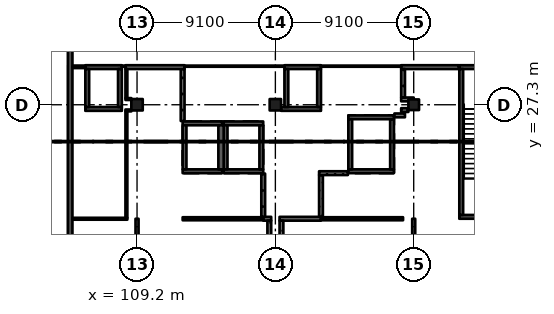
"""IFC4 building model, lengths in metres.
Left out: names, types, materials, properties, quantities, classifications, styles, units other than length and angle.
Written with IfcOpenShell. Run it as: python <this file> out.ifc"""

import sys

from ifc_helpers import new_model, si_unit, direction, frame, frame_2d, origin, origin_2d, place, context, subcontext, project, spatial, rectangle, extrude, element, fill, save


model = new_model("IFC4")
c1 = context("Model", 3, precision=1e-05, world=origin(), true_north=direction((0.0, 1.0)))
c2 = subcontext(c1, "Body", "Model", "MODEL_VIEW")
j1 = project(units=[si_unit("LENGTHUNIT", "METRE"), si_unit("PLANEANGLEUNIT", "RADIAN")], contexts=[c1])
p1 = place(None, origin())
s1 = spatial("IfcSite", under=j1, at=p1, CompositionType="ELEMENT")
p2 = place(p1, origin())
s2 = spatial("IfcBuilding", under=s1, at=p2, CompositionType="ELEMENT")
p3 = place(p2, frame((0.0, 0.0, 10.92)))
s3 = spatial("IfcBuildingStorey", under=s2, at=p3, CompositionType="ELEMENT", Elevation=10.92)
for number, where, z_axis, x_axis in (
    (1, (109.2, 27.3, 0.0), (0.0, 0.0, 1.0), (1.0, 0.0, 0.0)),
    (2, (118.3, 27.3, 0.0), (0.0, 0.0, 1.0), (1.0, 0.0, 0.0)),
):
    element("IfcColumn", number, at=place(p3, frame(where, z_axis=z_axis, x_axis=x_axis)), inside=s3, PredefinedType="COLUMN", context=c2, shape_type="SweptSolid", body=[
        extrude(rectangle(XDim=0.75, YDim=0.75, at=origin_2d()), origin(), (0.0, 0.0, 1.0), 4.55),
    ])
p4 = place(p3, frame((127.4, 27.3, 0.0), z_axis=(0.0, 0.0, 1.0), x_axis=(1.0, 0.0, 0.0)))
e3 = element("IfcColumn", 3, at=p4, inside=s3, PredefinedType="COLUMN", context=c2, shape_type="SweptSolid", body=[
    extrude(rectangle(XDim=0.7, YDim=0.7, at=origin_2d()), origin(), (0.0, 0.0, 1.0), 4.55),
])
p5 = place(p3, frame((104.8, 40.95, 0.0), z_axis=(0.0, 0.0, 1.0), x_axis=(0.0, -1.0, 0.0)))
e4 = element("IfcWall", 4, at=p5, inside=s3, PredefinedType="SHEAR", context=c2, shape_type="SweptSolid", body=[
    extrude(rectangle(XDim=22.75, YDim=0.3, at=frame_2d((11.375, 0.0))), origin(), (0.0, 0.0, 1.0), 4.55),
])
p6 = place(p3, frame((117.5, 22.925, 0.0), z_axis=(0.0, 0.0, 1.0), x_axis=(-1.0, 0.0, 0.0)))
e5 = element("IfcWall", 5, at=p6, inside=s3, PredefinedType="SHEAR", context=c2, shape_type="SweptSolid", body=[
    extrude(rectangle(XDim=2.6, YDim=0.25, at=frame_2d((1.3, 0.0))), origin(), (0.0, 0.0, 1.0), 4.55),
])
p7 = place(p6, frame((0.8, 0.0, 0.0)))
e6 = element("IfcOpeningElement", 6, at=p7, cuts=e5, PredefinedType="OPENING", context=c2, shape_type="SweptSolid", body=[
    extrude(rectangle(XDim=1.0, YDim=2.1, at=frame_2d((0.5, 1.05))), frame((0.0, 0.135, 0.0), z_axis=(0.0, -1.0, 0.0), x_axis=(1.0, 0.0, 0.0)), (0.0, 0.0, 1.0), 0.27),
])
p8 = place(p3, frame((117.5, 26.075, 0.0), z_axis=(0.0, 0.0, 1.0), x_axis=(-1.0, 0.0, 0.0)))
e7 = element("IfcWall", 7, at=p8, inside=s3, PredefinedType="SHEAR", context=c2, shape_type="SweptSolid", body=[
    extrude(rectangle(XDim=2.6, YDim=0.25, at=frame_2d((1.3, 0.0))), origin(), (0.0, 0.0, 1.0), 4.55),
])
for number, where, z_axis, x_axis in (
    (8, (115.025, 25.95, 0.0), (0.0, 0.0, 1.0), (0.0, -1.0, 0.0)),
    (9, (117.375, 25.95, 0.0), (0.0, 0.0, 1.0), (0.0, -1.0, 0.0)),
):
    element("IfcWall", number, at=place(p3, frame(where, z_axis=z_axis, x_axis=x_axis)), inside=s3, PredefinedType="SHEAR", context=c2, shape_type="SweptSolid", body=[
        extrude(rectangle(XDim=2.9, YDim=0.25, at=frame_2d((1.45, 0.0))), origin(), (0.0, 0.0, 1.0), 4.55),
    ])
p9 = place(p3, frame((114.8, 22.925, 0.0), z_axis=(0.0, 0.0, 1.0), x_axis=(-1.0, 0.0, 0.0)))
e10 = element("IfcWall", 10, at=p9, inside=s3, PredefinedType="SHEAR", context=c2, shape_type="SweptSolid", body=[
    extrude(rectangle(XDim=2.6, YDim=0.25, at=frame_2d((1.3, 0.0))), origin(), (0.0, 0.0, 1.0), 4.55),
])
p10 = place(p9, frame((0.8, 0.0, 0.0)))
e11 = element("IfcOpeningElement", 11, at=p10, cuts=e10, PredefinedType="OPENING", context=c2, shape_type="SweptSolid", body=[
    extrude(rectangle(XDim=1.0, YDim=2.1, at=frame_2d((0.5, 1.05))), frame((0.0, 0.135, 0.0), z_axis=(0.0, -1.0, 0.0), x_axis=(1.0, 0.0, 0.0)), (0.0, 0.0, 1.0), 0.27),
])
p11 = place(p3, frame((114.8, 26.075, 0.0), z_axis=(0.0, 0.0, 1.0), x_axis=(-1.0, 0.0, 0.0)))
e12 = element("IfcWall", 12, at=p11, inside=s3, PredefinedType="SHEAR", context=c2, shape_type="SweptSolid", body=[
    extrude(rectangle(XDim=2.6, YDim=0.25, at=frame_2d((1.3, 0.0))), origin(), (0.0, 0.0, 1.0), 4.55),
])
p12 = place(p3, frame((112.325, 25.95, 0.0), z_axis=(0.0, 0.0, 1.0), x_axis=(0.0, -1.0, 0.0)))
e13 = element("IfcWall", 13, at=p12, inside=s3, PredefinedType="SHEAR", context=c2, shape_type="SweptSolid", body=[
    extrude(rectangle(XDim=2.9, YDim=0.25, at=frame_2d((1.45, 0.0))), origin(), (0.0, 0.0, 1.0), 4.55),
])
p13 = place(p3, frame((114.725, 25.95, 0.0), z_axis=(0.0, 0.0, 1.0), x_axis=(0.0, -1.0, 0.0)))
e14 = element("IfcWall", 14, at=p13, inside=s3, PredefinedType="SHEAR", context=c2, shape_type="SweptSolid", body=[
    extrude(rectangle(XDim=2.9, YDim=0.35, at=frame_2d((1.45, 0.0))), origin(), (0.0, 0.0, 1.0), 4.55),
])
p14 = place(p3, frame((108.2, 27.025, 0.0), z_axis=(0.0, 0.0, 1.0), x_axis=(-1.0, 0.0, 0.0)))
e15 = element("IfcWall", 15, at=p14, inside=s3, PredefinedType="SHEAR", context=c2, shape_type="SweptSolid", body=[
    extrude(rectangle(XDim=2.4, YDim=0.25, at=frame_2d((1.2, 0.0))), origin(), (0.0, 0.0, 1.0), 4.55),
])
p15 = place(p14, frame((0.75, 0.0, 0.0)))
e16 = element("IfcOpeningElement", 16, at=p15, cuts=e15, PredefinedType="OPENING", context=c2, shape_type="SweptSolid", body=[
    extrude(rectangle(XDim=0.9, YDim=2.1, at=frame_2d((0.45, 1.05))), frame((0.0, 0.135, 0.0), z_axis=(0.0, -1.0, 0.0), x_axis=(1.0, 0.0, 0.0)), (0.0, 0.0, 1.0), 0.27),
])
p16 = place(p3, frame((108.2, 29.775, 0.0), z_axis=(0.0, 0.0, 1.0), x_axis=(-1.0, 0.0, 0.0)))
e17 = element("IfcWall", 17, at=p16, inside=s3, PredefinedType="SHEAR", context=c2, shape_type="SweptSolid", body=[
    extrude(rectangle(XDim=2.4, YDim=0.25, at=frame_2d((1.2, 0.0))), origin(), (0.0, 0.0, 1.0), 4.55),
])
for number, where, z_axis, x_axis in (
    (18, (105.925, 29.65, 0.0), (0.0, 0.0, 1.0), (0.0, -1.0, 0.0)),
    (19, (108.075, 29.65, 0.0), (0.0, 0.0, 1.0), (0.0, -1.0, 0.0)),
):
    element("IfcWall", number, at=place(p3, frame(where, z_axis=z_axis, x_axis=x_axis)), inside=s3, PredefinedType="SHEAR", context=c2, shape_type="SweptSolid", body=[
        extrude(rectangle(XDim=2.5, YDim=0.25, at=frame_2d((1.25, 0.0))), origin(), (0.0, 0.0, 1.0), 4.55),
    ])
p17 = place(p3, frame((121.3, 27.025, 0.0), z_axis=(0.0, 0.0, 1.0), x_axis=(-1.0, 0.0, 0.0)))
e20 = element("IfcWall", 20, at=p17, inside=s3, PredefinedType="SHEAR", context=c2, shape_type="SweptSolid", body=[
    extrude(rectangle(XDim=2.625, YDim=0.25, at=frame_2d((1.312, 0.0))), origin(), (0.0, 0.0, 1.0), 4.55),
])
p18 = place(p3, frame((121.3, 29.775, 0.0), z_axis=(0.0, 0.0, 1.0), x_axis=(-1.0, 0.0, 0.0)))
e21 = element("IfcWall", 21, at=p18, inside=s3, PredefinedType="SHEAR", context=c2, shape_type="SweptSolid", body=[
    extrude(rectangle(XDim=2.4, YDim=0.25, at=frame_2d((1.2, 0.0))), origin(), (0.0, 0.0, 1.0), 4.55),
])
p19 = place(p3, frame((119.025, 29.65, 0.0), z_axis=(0.0, 0.0, 1.0), x_axis=(0.0, -1.0, 0.0)))
e22 = element("IfcWall", 22, at=p19, inside=s3, PredefinedType="SHEAR", context=c2, shape_type="SweptSolid", body=[
    extrude(rectangle(XDim=2.5, YDim=0.25, at=frame_2d((1.25, 0.0))), origin(), (0.0, 0.0, 1.0), 4.55),
])
p20 = place(p3, frame((121.175, 29.65, 0.0), z_axis=(0.0, 0.0, 1.0), x_axis=(0.0, -1.0, 0.0)))
e23 = element("IfcWall", 23, at=p20, inside=s3, PredefinedType="SHEAR", context=c2, shape_type="SweptSolid", body=[
    extrude(rectangle(XDim=2.5, YDim=0.25, at=frame_2d((1.25, 0.0))), origin(), (0.0, 0.0, 1.0), 4.55),
])
p21 = place(p20, frame((0.9, 0.0, 0.0)))
e24 = element("IfcOpeningElement", 24, at=p21, cuts=e23, PredefinedType="OPENING", context=c2, shape_type="SweptSolid", body=[
    extrude(rectangle(XDim=0.7, YDim=2.1, at=frame_2d((0.35, 1.05))), frame((0.0, 0.135, 0.0), z_axis=(0.0, -1.0, 0.0), x_axis=(1.0, 0.0, 0.0)), (0.0, 0.0, 1.0), 0.27),
])
p22 = place(p3, frame((126.1, 22.925, 0.0), z_axis=(0.0, 0.0, 1.0), x_axis=(-1.0, 0.0, 0.0)))
e25 = element("IfcWall", 25, at=p22, inside=s3, PredefinedType="SHEAR", context=c2, shape_type="SweptSolid", body=[
    extrude(rectangle(XDim=3.0, YDim=0.25, at=frame_2d((1.5, 0.0))), origin(), (0.0, 0.0, 1.0), 4.55),
])
p23 = place(p22, frame((0.95, 0.0, 0.0)))
e26 = element("IfcOpeningElement", 26, at=p23, cuts=e25, PredefinedType="OPENING", context=c2, shape_type="SweptSolid", body=[
    extrude(rectangle(XDim=1.1, YDim=2.1, at=frame_2d((0.55, 1.05))), frame((0.0, 0.135, 0.0), z_axis=(0.0, -1.0, 0.0), x_axis=(1.0, 0.0, 0.0)), (0.0, 0.0, 1.0), 0.27),
])
p24 = place(p3, frame((126.1, 26.475, 0.0), z_axis=(0.0, 0.0, 1.0), x_axis=(-1.0, 0.0, 0.0)))
e27 = element("IfcWall", 27, at=p24, inside=s3, PredefinedType="SHEAR", context=c2, shape_type="SweptSolid", body=[
    extrude(rectangle(XDim=3.0, YDim=0.25, at=frame_2d((1.5, 0.0))), origin(), (0.0, 0.0, 1.0), 4.55),
])
for number, where, z_axis, x_axis in (
    (28, (123.225, 26.35, 0.0), (0.0, 0.0, 1.0), (0.0, -1.0, 0.0)),
    (29, (125.975, 26.35, 0.0), (0.0, 0.0, 1.0), (0.0, -1.0, 0.0)),
):
    element("IfcWall", number, at=place(p3, frame(where, z_axis=z_axis, x_axis=x_axis)), inside=s3, PredefinedType="SHEAR", context=c2, shape_type="SweptSolid", body=[
        extrude(rectangle(XDim=3.3, YDim=0.25, at=frame_2d((1.65, 0.0))), origin(), (0.0, 0.0, 1.0), 4.55),
    ])
p25 = place(p3, frame((135.8, 19.925, 0.0), z_axis=(0.0, 0.0, 1.0), x_axis=(-1.0, 0.0, 0.0)))
e30 = element("IfcWall", 30, at=p25, inside=s3, PredefinedType="SHEAR", context=c2, shape_type="SweptSolid", body=[
    extrude(rectangle(XDim=5.4, YDim=0.25, at=frame_2d((2.7, 0.0))), origin(), (0.0, 0.0, 1.0), 4.55),
])
p26 = place(p25, frame((1.5, 0.0, 0.0)))
e31 = element("IfcOpeningElement", 31, at=p26, cuts=e30, PredefinedType="OPENING", context=c2, shape_type="SweptSolid", body=[
    extrude(rectangle(XDim=2.4, YDim=2.1, at=frame_2d((1.2, 1.05))), frame((0.0, 0.135, 0.0), z_axis=(0.0, -1.0, 0.0), x_axis=(1.0, 0.0, 0.0)), (0.0, 0.0, 1.0), 0.27),
])
p27 = place(p3, frame((135.8, 29.775, 0.0), z_axis=(0.0, 0.0, 1.0), x_axis=(-1.0, 0.0, 0.0)))
e32 = element("IfcWall", 32, at=p27, inside=s3, PredefinedType="SHEAR", context=c2, shape_type="SweptSolid", body=[
    extrude(rectangle(XDim=5.4, YDim=0.25, at=frame_2d((2.7, 0.0))), origin(), (0.0, 0.0, 1.0), 4.55),
])
p28 = place(p3, frame((130.525, 29.65, 0.0), z_axis=(0.0, 0.0, 1.0), x_axis=(0.0, -1.0, 0.0)))
e33 = element("IfcWall", 33, at=p28, inside=s3, PredefinedType="SHEAR", context=c2, shape_type="SweptSolid", body=[
    extrude(rectangle(XDim=9.6, YDim=0.25, at=frame_2d((4.8, 0.0))), origin(), (0.0, 0.0, 1.0), 4.55),
])
p29 = place(p3, frame((104.95, 19.8, 0.0), z_axis=(0.0, 0.0, 1.0), x_axis=(1.0, 0.0, 0.0)))
e34 = element("IfcWall", 34, at=p29, inside=s3, PredefinedType="PARTITIONING", context=c2, shape_type="SweptSolid", body=[
    extrude(rectangle(XDim=3.613, YDim=0.125, at=frame_2d((1.806, 0.0))), origin(), (0.0, 0.0, 1.0), 4.25),
])
p30 = place(p29, frame((1.35, 0.0, 0.0)))
e35 = element("IfcOpeningElement", 35, at=p30, cuts=e34, PredefinedType="OPENING", context=c2, shape_type="SweptSolid", body=[
    extrude(rectangle(XDim=0.9, YDim=2.1, at=frame_2d((0.45, 1.05))), frame((0.0, 0.073, 0.0), z_axis=(0.0, -1.0, 0.0), x_axis=(1.0, 0.0, 0.0)), (0.0, 0.0, 1.0), 0.145),
])
p31 = place(p3, frame((104.95, 29.775, 0.0), z_axis=(0.0, 0.0, 1.0), x_axis=(1.0, 0.0, 0.0)))
e36 = element("IfcWall", 36, at=p31, inside=s3, PredefinedType="PARTITIONING", context=c2, shape_type="SweptSolid", body=[
    extrude(rectangle(XDim=0.82, YDim=0.125, at=frame_2d((0.41, 0.0))), origin(), (0.0, 0.0, 1.0), 4.25),
])
p32 = place(p3, frame((108.438, 26.925, 0.0), z_axis=(0.0, 0.0, 1.0), x_axis=(1.0, 0.0, 0.0)))
e37 = element("IfcWall", 37, at=p32, inside=s3, PredefinedType="PARTITIONING", context=c2, shape_type="SweptSolid", body=[
    extrude(rectangle(XDim=0.387, YDim=0.125, at=frame_2d((0.194, 0.0))), origin(), (0.0, 0.0, 1.0), 4.25),
])
p33 = place(p3, frame((108.5, 19.863, 0.0), z_axis=(0.0, 0.0, 1.0), x_axis=(0.0, 1.0, 0.0)))
e38 = element("IfcWall", 38, at=p33, inside=s3, PredefinedType="PARTITIONING", context=c2, shape_type="SweptSolid", body=[
    extrude(rectangle(XDim=7.0, YDim=0.125, at=frame_2d((3.5, 0.0))), origin(), (0.0, 0.0, 1.0), 4.25),
])
p34 = place(p3, frame((108.5, 27.738, 0.0), z_axis=(0.0, 0.0, 1.0), x_axis=(0.0, 1.0, 0.0)))
e39 = element("IfcWall", 39, at=p34, inside=s3, PredefinedType="PARTITIONING", context=c2, shape_type="SweptSolid", body=[
    extrude(rectangle(XDim=1.912, YDim=0.125, at=frame_2d((0.956, 0.0))), origin(), (0.0, 0.0, 1.0), 4.25),
])
p35 = place(p3, frame((108.825, 27.675, 0.0), z_axis=(0.0, 0.0, 1.0), x_axis=(-1.0, 0.0, 0.0)))
e40 = element("IfcWall", 40, at=p35, inside=s3, PredefinedType="PARTITIONING", context=c2, shape_type="SweptSolid", body=[
    extrude(rectangle(XDim=0.387, YDim=0.125, at=frame_2d((0.194, 0.0))), origin(), (0.0, 0.0, 1.0), 4.25),
])
p36 = place(p3, frame((109.2, 18.6, 0.0), z_axis=(0.0, 0.0, 1.0), x_axis=(0.0, 1.0, 0.0)))
e41 = element("IfcWall", 41, at=p36, inside=s3, PredefinedType="PARTITIONING", context=c2, shape_type="SweptSolid", body=[
    extrude(rectangle(XDim=1.2, YDim=0.2, at=frame_2d((0.6, 0.0))), origin(), (0.0, 0.0, 1.0), 3.55),
])
p37 = place(p3, frame((112.2, 19.8, 0.0), z_axis=(0.0, 0.0, 1.0), x_axis=(1.0, 0.0, 0.0)))
e42 = element("IfcWall", 42, at=p37, inside=s3, PredefinedType="PARTITIONING", context=c2, shape_type="SweptSolid", body=[
    extrude(rectangle(XDim=5.3, YDim=0.2, at=frame_2d((2.65, 0.0))), origin(), (0.0, 0.0, 1.0), 4.25),
])
p38 = place(p37, frame((1.75, 0.0, 0.0)))
e43 = element("IfcOpeningElement", 43, at=p38, cuts=e42, PredefinedType="OPENING", context=c2, shape_type="SweptSolid", body=[
    extrude(rectangle(XDim=1.8, YDim=2.4, at=frame_2d((0.9, 1.2))), frame((0.0, 0.11, 0.0), z_axis=(0.0, -1.0, 0.0), x_axis=(1.0, 0.0, 0.0)), (0.0, 0.0, 1.0), 0.22),
])
p39 = place(p3, frame((112.2, 26.23, 0.0), z_axis=(0.0, 0.0, 1.0), x_axis=(0.0, 1.0, 0.0)))
e44 = element("IfcWall", 44, at=p39, inside=s3, PredefinedType="SOLIDWALL", context=c2, shape_type="SweptSolid", body=[
    extrude(rectangle(XDim=3.42, YDim=0.25, at=frame_2d((1.71, 0.0))), origin(), (0.0, 0.0, 1.0), 4.25),
])
p40 = place(p3, frame((112.325, 29.775, 0.0), z_axis=(0.0, 0.0, 1.0), x_axis=(-1.0, 0.0, 0.0)))
e45 = element("IfcWall", 45, at=p40, inside=s3, PredefinedType="SOLIDWALL", context=c2, shape_type="SweptSolid", body=[
    extrude(rectangle(XDim=3.887, YDim=0.25, at=frame_2d((1.944, 0.0))), origin(), (0.0, 0.0, 1.0), 4.25),
])
p41 = place(p3, frame((117.5, 19.8, 0.0), z_axis=(0.0, 0.0, 1.0), x_axis=(1.0, 0.0, 0.0)))
e46 = element("IfcWall", 46, at=p41, inside=s3, PredefinedType="SOLIDWALL", context=c2, shape_type="SweptSolid", body=[
    extrude(rectangle(XDim=0.525, YDim=0.25, at=frame_2d((0.262, 0.0))), origin(), (0.0, 0.0, 1.0), 4.25),
])
p42 = place(p3, frame((117.5, 19.925, 0.0), z_axis=(0.0, 0.0, 1.0), x_axis=(0.0, 1.0, 0.0)))
e47 = element("IfcWall", 47, at=p42, inside=s3, PredefinedType="SOLIDWALL", context=c2, shape_type="SweptSolid", body=[
    extrude(rectangle(XDim=2.845, YDim=0.25, at=frame_2d((1.422, 0.0))), origin(), (0.0, 0.0, 1.0), 4.25),
])
p43 = place(p3, frame((117.9, 19.675, 0.0), z_axis=(0.0, 0.0, 1.0), x_axis=(0.0, -1.0, 0.0)))
e48 = element("IfcWall", 48, at=p43, inside=s3, PredefinedType="SOLIDWALL", context=c2, shape_type="SweptSolid", body=[
    extrude(rectangle(XDim=1.075, YDim=0.25, at=frame_2d((0.538, 0.0))), origin(), (0.0, 0.0, 1.0), 4.25),
])
p44 = place(p3, frame((118.575, 19.8, 0.0), z_axis=(0.0, 0.0, 1.0), x_axis=(1.0, 0.0, 0.0)))
e49 = element("IfcWall", 49, at=p44, inside=s3, PredefinedType="SOLIDWALL", context=c2, shape_type="SweptSolid", body=[
    extrude(rectangle(XDim=2.725, YDim=0.25, at=frame_2d((1.363, 0.0))), origin(), (0.0, 0.0, 1.0), 4.25),
])
p45 = place(p44, frame((0.85, 0.0, 0.0)))
e50 = element("IfcOpeningElement", 50, at=p45, cuts=e49, PredefinedType="OPENING", context=c2, shape_type="SweptSolid", body=[
    extrude(rectangle(XDim=1.0, YDim=2.1, at=frame_2d((0.5, 1.05))), frame((0.0, 0.135, 0.0), z_axis=(0.0, -1.0, 0.0), x_axis=(1.0, 0.0, 0.0)), (0.0, 0.0, 1.0), 0.27),
])
p46 = place(p3, frame((118.7, 18.6, 0.0), z_axis=(0.0, 0.0, 1.0), x_axis=(0.0, 1.0, 0.0)))
e51 = element("IfcWall", 51, at=p46, inside=s3, PredefinedType="SOLIDWALL", context=c2, shape_type="SweptSolid", body=[
    extrude(rectangle(XDim=1.075, YDim=0.25, at=frame_2d((0.538, 0.0))), origin(), (0.0, 0.0, 1.0), 4.25),
])
p47 = place(p3, frame((121.3, 19.8, 0.0), z_axis=(0.0, 0.0, 1.0), x_axis=(1.0, 0.0, 0.0)))
e52 = element("IfcWall", 52, at=p47, inside=s3, PredefinedType="PARTITIONING", context=c2, shape_type="SweptSolid", body=[
    extrude(rectangle(XDim=5.4, YDim=0.2, at=frame_2d((2.7, 0.0))), origin(), (0.0, 0.0, 1.0), 4.25),
])
p48 = place(p47, frame((1.85, 0.0, 0.0)))
e53 = element("IfcOpeningElement", 53, at=p48, cuts=e52, PredefinedType="OPENING", context=c2, shape_type="SweptSolid", body=[
    extrude(rectangle(XDim=1.8, YDim=2.4, at=frame_2d((0.9, 1.2))), frame((0.0, 0.11, 0.0), z_axis=(0.0, -1.0, 0.0), x_axis=(1.0, 0.0, 0.0)), (0.0, 0.0, 1.0), 0.22),
])
p49 = place(p3, frame((121.3, 22.675, 0.0), z_axis=(0.0, 0.0, 1.0), x_axis=(0.0, -1.0, 0.0)))
e54 = element("IfcWall", 54, at=p49, inside=s3, PredefinedType="SOLIDWALL", context=c2, shape_type="SweptSolid", body=[
    extrude(rectangle(XDim=2.75, YDim=0.25, at=frame_2d((1.375, 0.0))), origin(), (0.0, 0.0, 1.0), 4.25),
])
p50 = place(p3, frame((123.07, 22.8, 0.0), z_axis=(0.0, 0.0, 1.0), x_axis=(-1.0, 0.0, 0.0)))
e55 = element("IfcWall", 55, at=p50, inside=s3, PredefinedType="SOLIDWALL", context=c2, shape_type="SweptSolid", body=[
    extrude(rectangle(XDim=1.895, YDim=0.25, at=frame_2d((0.948, 0.0))), origin(), (0.0, 0.0, 1.0), 4.25),
])
p51 = place(p3, frame((126.575, 26.95, 0.0), z_axis=(0.0, 0.0, 1.0), x_axis=(1.0, 0.0, 0.0)))
e56 = element("IfcWall", 56, at=p51, inside=s3, PredefinedType="SOLIDWALL", context=c2, shape_type="SweptSolid", body=[
    extrude(rectangle(XDim=0.475, YDim=0.25, at=frame_2d((0.238, 0.0))), origin(), (0.0, 0.0, 1.0), 4.25),
])
p52 = place(p3, frame((126.575, 27.65, 0.0), z_axis=(0.0, 0.0, 1.0), x_axis=(1.0, 0.0, 0.0)))
e57 = element("IfcWall", 57, at=p52, inside=s3, PredefinedType="SOLIDWALL", context=c2, shape_type="SweptSolid", body=[
    extrude(rectangle(XDim=0.825, YDim=0.25, at=frame_2d((0.413, 0.0))), origin(), (0.0, 0.0, 1.0), 4.25),
])
p53 = place(p3, frame((126.575, 29.775, 0.0), z_axis=(0.0, 0.0, 1.0), x_axis=(1.0, 0.0, 0.0)))
e58 = element("IfcWall", 58, at=p53, inside=s3, PredefinedType="SOLIDWALL", context=c2, shape_type="SweptSolid", body=[
    extrude(rectangle(XDim=3.795, YDim=0.25, at=frame_2d((1.897, 0.0))), origin(), (0.0, 0.0, 1.0), 4.25),
])
p54 = place(p3, frame((126.7, 27.775, 0.0), z_axis=(0.0, 0.0, 1.0), x_axis=(0.0, 1.0, 0.0)))
e59 = element("IfcWall", 59, at=p54, inside=s3, PredefinedType="SOLIDWALL", context=c2, shape_type="SweptSolid", body=[
    extrude(rectangle(XDim=1.875, YDim=0.25, at=frame_2d((0.938, 0.0))), origin(), (0.0, 0.0, 1.0), 4.25),
])
p55 = place(p3, frame((126.825, 26.6, 0.0), z_axis=(0.0, 0.0, 1.0), x_axis=(-1.0, 0.0, 0.0)))
e60 = element("IfcWall", 60, at=p55, inside=s3, PredefinedType="SOLIDWALL", context=c2, shape_type="SweptSolid", body=[
    extrude(rectangle(XDim=0.695, YDim=0.25, at=frame_2d((0.348, 0.0))), origin(), (0.0, 0.0, 1.0), 4.25),
])
p56 = place(p3, frame((127.4, 18.575, 0.0), z_axis=(0.0, 0.0, 1.0), x_axis=(0.0, 1.0, 0.0)))
e61 = element("IfcWall", 61, at=p56, inside=s3, PredefinedType="PARTITIONING", context=c2, shape_type="SweptSolid", body=[
    extrude(rectangle(XDim=1.225, YDim=0.2, at=frame_2d((0.613, 0.0))), origin(), (0.0, 0.0, 1.0), 3.55),
])
p57 = place(p45, origin())
e62 = element("IfcDoor", 62, at=p57, inside=s3, OperationType="SINGLE_SWING_RIGHT", PredefinedType="DOOR", context=c2, shape_type="SweptSolid", body=[
    extrude(rectangle(XDim=1.0, YDim=2.1, at=frame_2d((0.5, 1.05))), frame((0.0, 0.025, 0.0), z_axis=(0.0, -1.0, 0.0), x_axis=(1.0, 0.0, 0.0)), (0.0, 0.0, 1.0), 0.05),
])
fill(e50, e62)
p58 = place(p30, origin())
e63 = element("IfcDoor", 63, at=p58, inside=s3, OperationType="SINGLE_SWING_RIGHT", PredefinedType="DOOR", context=c2, shape_type="SweptSolid", body=[
    extrude(rectangle(XDim=0.9, YDim=2.1, at=frame_2d((0.45, 1.05))), frame((0.0, 0.025, 0.0), z_axis=(0.0, -1.0, 0.0), x_axis=(1.0, 0.0, 0.0)), (0.0, 0.0, 1.0), 0.05),
])
fill(e35, e63)
p59 = place(p38, origin())
e64 = element("IfcDoor", 64, at=p59, inside=s3, OperationType="DOUBLE_DOOR_SINGLE_SWING", PredefinedType="DOOR", context=c2, shape_type="SweptSolid", body=[
    extrude(rectangle(XDim=1.8, YDim=2.4, at=frame_2d((0.9, 1.2))), frame((0.0, 0.025, 0.0), z_axis=(0.0, -1.0, 0.0), x_axis=(1.0, 0.0, 0.0)), (0.0, 0.0, 1.0), 0.05),
])
fill(e43, e64)
p60 = place(p48, origin())
e65 = element("IfcDoor", 65, at=p60, inside=s3, OperationType="DOUBLE_DOOR_SINGLE_SWING", PredefinedType="DOOR", context=c2, shape_type="SweptSolid", body=[
    extrude(rectangle(XDim=1.8, YDim=2.4, at=frame_2d((0.9, 1.2))), frame((0.0, 0.025, 0.0), z_axis=(0.0, -1.0, 0.0), x_axis=(1.0, 0.0, 0.0)), (0.0, 0.0, 1.0), 0.05),
])
fill(e53, e65)
p61 = place(p15, origin())
e66 = element("IfcDoor", 66, at=p61, inside=s3, OperationType="SINGLE_SWING_LEFT", PredefinedType="DOOR", context=c2, shape_type="SweptSolid", body=[
    extrude(rectangle(XDim=0.9, YDim=2.1, at=frame_2d((0.45, 1.05))), frame((0.0, 0.025, 0.0), z_axis=(0.0, -1.0, 0.0), x_axis=(1.0, 0.0, 0.0)), (0.0, 0.0, 1.0), 0.05),
])
fill(e16, e66)
p62 = place(p21, origin())
e67 = element("IfcDoor", 67, at=p62, inside=s3, OperationType="SINGLE_SWING_RIGHT", PredefinedType="DOOR", context=c2, shape_type="SweptSolid", body=[
    extrude(rectangle(XDim=0.7, YDim=2.1, at=frame_2d((0.35, 1.05))), frame((0.0, 0.025, 0.0), z_axis=(0.0, -1.0, 0.0), x_axis=(1.0, 0.0, 0.0)), (0.0, 0.0, 1.0), 0.05),
])
fill(e24, e67)
p63 = place(p7, origin())
e68 = element("IfcDoor", 68, at=p63, inside=s3, OperationType="DOUBLE_DOOR_SLIDING", PredefinedType="DOOR", context=c2, shape_type="SweptSolid", body=[
    extrude(rectangle(XDim=1.0, YDim=2.1, at=frame_2d((0.5, 1.05))), frame((0.0, 0.025, 0.0), z_axis=(0.0, -1.0, 0.0), x_axis=(1.0, 0.0, 0.0)), (0.0, 0.0, 1.0), 0.05),
])
fill(e6, e68)
p64 = place(p10, origin())
e69 = element("IfcDoor", 69, at=p64, inside=s3, OperationType="DOUBLE_DOOR_SLIDING", PredefinedType="DOOR", context=c2, shape_type="SweptSolid", body=[
    extrude(rectangle(XDim=1.0, YDim=2.1, at=frame_2d((0.5, 1.05))), frame((0.0, 0.025, 0.0), z_axis=(0.0, -1.0, 0.0), x_axis=(1.0, 0.0, 0.0)), (0.0, 0.0, 1.0), 0.05),
])
fill(e11, e69)
p65 = place(p23, origin())
e70 = element("IfcDoor", 70, at=p65, inside=s3, OperationType="DOUBLE_DOOR_SLIDING", PredefinedType="DOOR", context=c2, shape_type="SweptSolid", body=[
    extrude(rectangle(XDim=1.1, YDim=2.1, at=frame_2d((0.55, 1.05))), frame((0.0, 0.025, 0.0), z_axis=(0.0, -1.0, 0.0), x_axis=(1.0, 0.0, 0.0)), (0.0, 0.0, 1.0), 0.05),
])
fill(e26, e70)
save(model, sys.argv[1])
